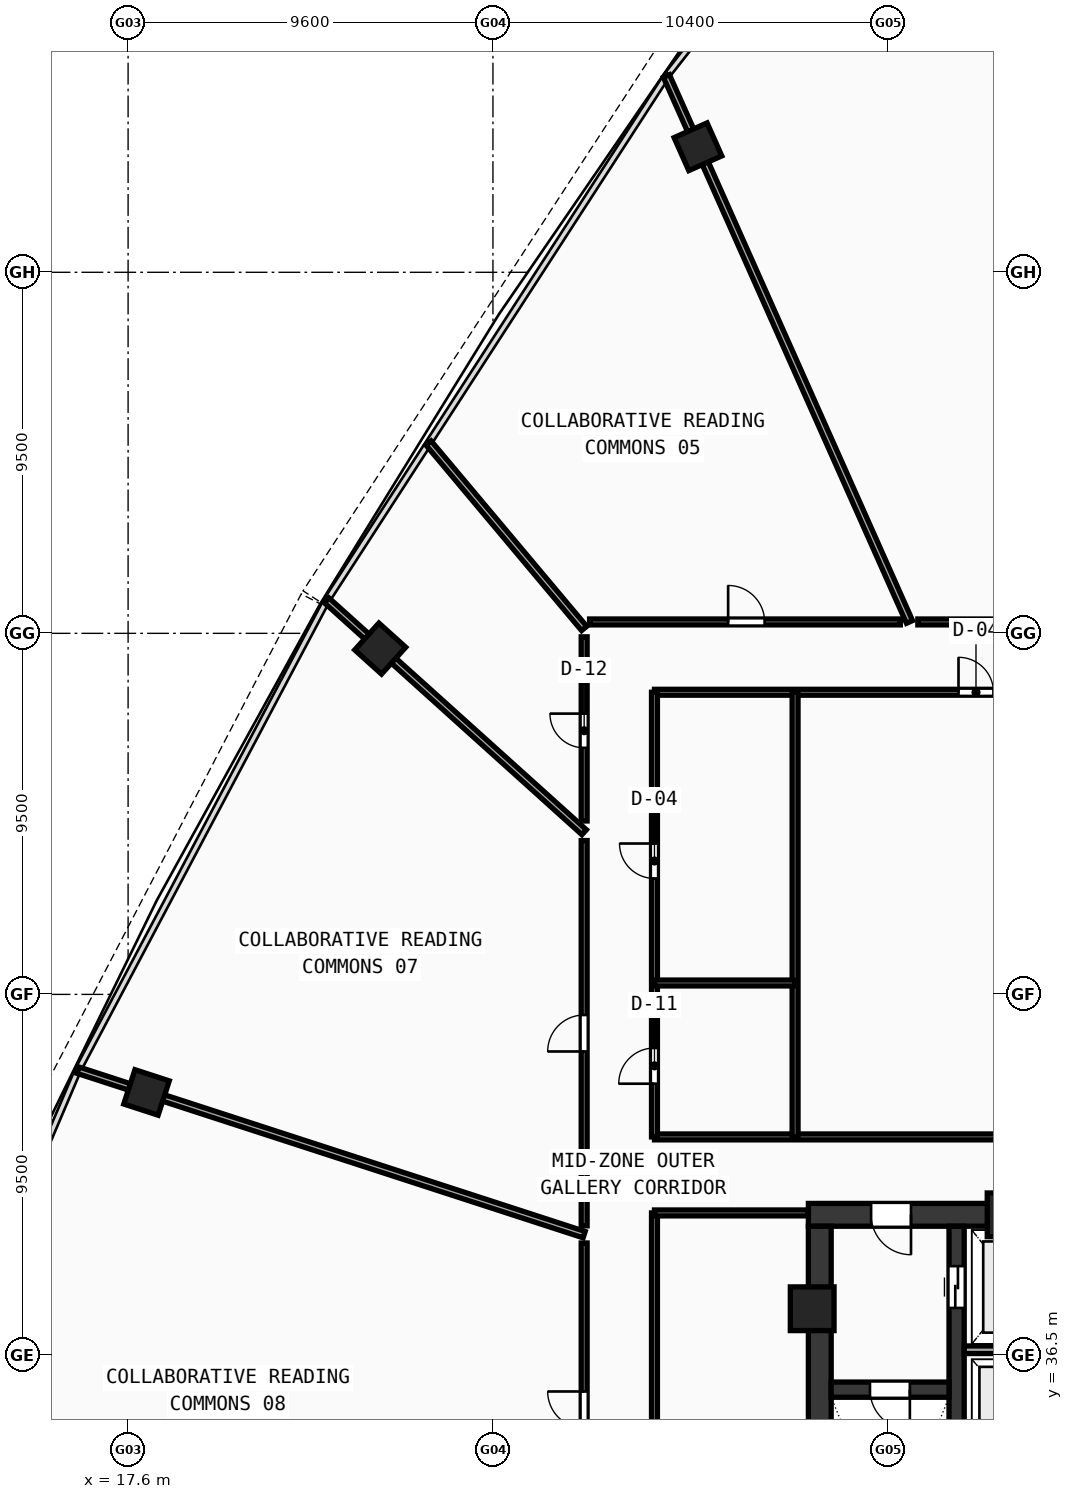
"""IFC4 building model, lengths in metres.
Left out: names, types, materials, properties, quantities, classifications, styles, units other than length and angle.
Written with IfcOpenShell. Run it as: python <this file> out.ifc"""

import sys

from ifc_helpers import new_model, si_unit, direction, frame, frame_2d, origin, origin_with_axes, origin_2d, place, context, subcontext, project, spatial, rectangle, hollow_rectangle, extrude, source, transform, mapped, element, fill, save


model = new_model("IFC4")
c1 = context("Model", 3, precision=1e-05, world=origin(), true_north=direction((0.0, 1.0)))
c2 = subcontext(c1, "Body", "Model", "MODEL_VIEW")
j1 = project(units=[si_unit("LENGTHUNIT", "METRE"), si_unit("PLANEANGLEUNIT", "RADIAN")], contexts=[c1])
p1 = place(None, origin())
s1 = spatial("IfcSite", under=j1, at=p1, CompositionType="ELEMENT")
p2 = place(p1, origin())
s2 = spatial("IfcBuilding", under=s1, at=p2, CompositionType="ELEMENT")
p3 = place(p2, frame((0.0, 0.0, 133.51)))
s3 = spatial("IfcBuildingStorey", under=s2, at=p3, CompositionType="ELEMENT", Elevation=133.51)
p4 = place(p3, frame((35.5, 40.2, 0.0), z_axis=(0.0, 0.0, 1.0), x_axis=(1.0, 0.0, 0.0)))
e1 = element("IfcWall", 1, at=p4, inside=s3, PredefinedType="SHEAR", context=c2, shape_type="SweptSolid", body=[
    extrude(rectangle(XDim=11.3, YDim=0.6, at=frame_2d((5.65, 0.0))), origin(), (0.0, 0.0, 1.0), 3.42),
])
p5 = place(p4, frame((1.65, 0.0, 0.0)))
e2 = element("IfcOpeningElement", 2, at=p5, cuts=e1, PredefinedType="OPENING", context=c2, shape_type="SweptSolid", body=[
    extrude(rectangle(XDim=1.05, YDim=2.1, at=frame_2d((0.525, 1.05))), frame((0.0, 0.31, 0.0), z_axis=(0.0, -1.0, 0.0), x_axis=(1.0, 0.0, 0.0)), (0.0, 0.0, 1.0), 0.62),
])
p6 = place(p3, frame((35.8, 27.8, 0.0), z_axis=(0.0, 0.0, 1.0), x_axis=(0.0, 1.0, 0.0)))
e3 = element("IfcWall", 3, at=p6, inside=s3, PredefinedType="SHEAR", context=c2, shape_type="SweptSolid", body=[
    extrude(rectangle(XDim=12.1, YDim=0.6, at=frame_2d((6.05, 0.0))), origin(), (0.0, 0.0, 1.0), 3.42),
])
p7 = place(p3, frame((39.4, 27.8, 0.0), z_axis=(0.0, 0.0, 1.0), x_axis=(0.0, 1.0, 0.0)))
e4 = element("IfcWall", 4, at=p7, inside=s3, PredefinedType="SHEAR", context=c2, shape_type="SweptSolid", body=[
    extrude(rectangle(XDim=12.1, YDim=0.4, at=frame_2d((6.05, 0.0))), origin(), (0.0, 0.0, 1.0), 3.42),
])
p8 = place(p7, frame((9.95, 0.0, 0.0)))
e5 = element("IfcOpeningElement", 5, at=p8, cuts=e4, PredefinedType="OPENING", context=c2, shape_type="SweptSolid", body=[
    extrude(rectangle(XDim=1.1, YDim=2.1, at=frame_2d((0.55, 1.05))), frame((0.0, 0.21, 0.0), z_axis=(0.0, -1.0, 0.0), x_axis=(1.0, 0.0, 0.0)), (0.0, 0.0, 1.0), 0.42),
])
p9 = place(p3, frame((36.1, 35.6, 0.0), z_axis=(0.0, 0.0, 1.0), x_axis=(1.0, 0.0, 0.0)))
e6 = element("IfcWall", 6, at=p9, inside=s3, PredefinedType="SHEAR", context=c2, shape_type="SweptSolid", body=[
    extrude(rectangle(XDim=3.1, YDim=0.4, at=frame_2d((1.55, 0.0))), origin(), (0.0, 0.0, 1.0), 3.42),
])
p10 = place(p9, frame((1.02, 0.0, 0.0)))
e7 = element("IfcOpeningElement", 7, at=p10, cuts=e6, PredefinedType="OPENING", context=c2, shape_type="SweptSolid", body=[
    extrude(rectangle(XDim=1.05, YDim=2.1, at=frame_2d((0.525, 1.05))), frame((0.0, 0.21, 0.0), z_axis=(0.0, -1.0, 0.0), x_axis=(1.0, 0.0, 0.0)), (0.0, 0.0, 1.0), 0.42),
])
m1 = source(origin(), c2, "Body", "SweptSolid", [
    extrude(hollow_rectangle(XDim=1.15, YDim=1.15, WallThickness=0.048, at=origin_2d()), origin(), (0.0, 0.0, 1.0), 3.68),
])
for number, where, z_axis, x_axis in (
    (8, (40.781, 40.2, -0.26), (0.0, 0.0, 1.0), (1.0, 0.0, 0.0)),
    (9, (35.6, 37.729, -0.26), (0.0, 0.0, 1.0), (1.0, 0.0, 0.0)),
):
    element("IfcColumn", number, at=place(p3, frame(where, z_axis=z_axis, x_axis=x_axis)), inside=s3, PredefinedType="COLUMN", context=c2, shape_type="MappedRepresentation", body=[
        mapped(m1, transform((0.0, 0.0, 0.0), scale=1.0)),
    ])
m2 = source(origin(), c2, "Body", "SweptSolid", [
    extrude(hollow_rectangle(XDim=0.95, YDim=0.95, WallThickness=0.04, at=origin_2d()), origin(), (0.0, 0.0, 1.0), 3.68),
])
for number, where, z_axis, x_axis in (
    (10, (32.594, 68.303, -0.26), (0.0, 0.0, 1.0), (-0.914, -0.407, 0.0)),
    (11, (24.234, 55.099, -0.26), (0.0, 0.0, 1.0), (-0.669, -0.743, 0.0)),
    (12, (18.085, 43.42, -0.26), (0.0, 0.0, 1.0), (-0.309, -0.951, 0.0)),
):
    element("IfcColumn", number, at=place(p3, frame(where, z_axis=z_axis, x_axis=x_axis)), inside=s3, PredefinedType="COLUMN", context=c2, shape_type="MappedRepresentation", body=[
        mapped(m2, transform((0.0, 0.0, 0.0), scale=1.0)),
    ])
p11 = place(p3, frame((39.6, 36.65, 0.0), z_axis=(0.0, 0.0, 1.0), x_axis=(1.0, 0.0, 0.0)))
e13 = element("IfcWall", 13, at=p11, inside=s3, PredefinedType="SOLIDWALL", context=c2, shape_type="SweptSolid", body=[
    extrude(rectangle(XDim=2.72, YDim=0.2, at=frame_2d((1.36, 0.0))), origin(), (0.0, 0.0, 1.0), 3.42),
])
p12 = place(p3, frame((31.45, 42.25, 0.0), z_axis=(0.0, 0.0, 1.0), x_axis=(1.0, 0.0, 0.0)))
e14 = element("IfcWall", 14, at=p12, inside=s3, PredefinedType="PARTITIONING", context=c2, shape_type="SweptSolid", body=[
    extrude(rectangle(XDim=33.1, YDim=0.155, at=frame_2d((16.55, 0.0))), origin(), (0.0, 0.0, 1.0), 2.77),
])
p13 = place(p3, frame((31.45, 53.95, 0.0), z_axis=(0.0, 0.0, 1.0), x_axis=(1.0, 0.0, 0.0)))
e15 = element("IfcWall", 15, at=p13, inside=s3, PredefinedType="PARTITIONING", context=c2, shape_type="SweptSolid", body=[
    extrude(rectangle(XDim=33.1, YDim=0.155, at=frame_2d((16.55, 0.0))), origin(), (0.0, 0.0, 1.0), 2.77),
])
p14 = place(p13, frame((8.0, 0.0, 0.0)))
e16 = element("IfcOpeningElement", 16, at=p14, cuts=e15, PredefinedType="OPENING", context=c2, shape_type="SweptSolid", body=[
    extrude(rectangle(XDim=0.92, YDim=2.1, at=frame_2d((0.46, 1.05))), frame((0.0, 0.087, 0.0), z_axis=(0.0, -1.0, 0.0), x_axis=(1.0, 0.0, 0.0)), (0.0, 0.0, 1.0), 0.175),
])
p15 = place(p13, frame((22.55, 0.0, 0.0)))
e17 = element("IfcOpeningElement", 17, at=p15, cuts=e15, PredefinedType="OPENING", context=c2, shape_type="SweptSolid", body=[
    extrude(rectangle(XDim=0.92, YDim=2.1, at=frame_2d((0.46, 1.05))), frame((0.0, 0.087, 0.0), z_axis=(0.0, -1.0, 0.0), x_axis=(1.0, 0.0, 0.0)), (0.0, 0.0, 1.0), 0.175),
])
p16 = place(p3, frame((31.45, 42.25, 0.0), z_axis=(0.0, 0.0, 1.0), x_axis=(0.0, 1.0, 0.0)))
e18 = element("IfcWall", 18, at=p16, inside=s3, PredefinedType="PARTITIONING", context=c2, shape_type="SweptSolid", body=[
    extrude(rectangle(XDim=11.7, YDim=0.155, at=frame_2d((5.85, 0.0))), origin(), (0.0, 0.0, 1.0), 2.77),
])
p17 = place(p16, frame((1.4, 0.0, 0.0)))
e19 = element("IfcOpeningElement", 19, at=p17, cuts=e18, PredefinedType="OPENING", context=c2, shape_type="SweptSolid", body=[
    extrude(rectangle(XDim=0.94, YDim=2.1, at=frame_2d((0.47, 1.05))), frame((0.0, 0.087, 0.0), z_axis=(0.0, -1.0, 0.0), x_axis=(1.0, 0.0, 0.0)), (0.0, 0.0, 1.0), 0.175),
])
p18 = place(p16, frame((6.8, 0.0, 0.0)))
e20 = element("IfcOpeningElement", 20, at=p18, cuts=e18, PredefinedType="OPENING", context=c2, shape_type="SweptSolid", body=[
    extrude(rectangle(XDim=0.92, YDim=2.1, at=frame_2d((0.46, 1.05))), frame((0.0, 0.087, 0.0), z_axis=(0.0, -1.0, 0.0), x_axis=(1.0, 0.0, 0.0)), (0.0, 0.0, 1.0), 0.175),
])
p19 = place(p3, frame((35.15, 42.25, 0.0), z_axis=(0.0, 0.0, 1.0), x_axis=(0.0, 1.0, 0.0)))
e21 = element("IfcWall", 21, at=p19, inside=s3, PredefinedType="PARTITIONING", context=c2, shape_type="SweptSolid", body=[
    extrude(rectangle(XDim=11.7, YDim=0.155, at=frame_2d((5.85, 0.0))), origin(), (0.0, 0.0, 1.0), 2.77),
])
p20 = place(p3, frame((31.45, 46.3, 0.0), z_axis=(0.0, 0.0, 1.0), x_axis=(1.0, 0.0, 0.0)))
e22 = element("IfcWall", 22, at=p20, inside=s3, PredefinedType="PARTITIONING", context=c2, shape_type="SweptSolid", body=[
    extrude(rectangle(XDim=3.7, YDim=0.155, at=frame_2d((1.85, 0.0))), origin(), (0.0, 0.0, 1.0), 2.77),
])
p21 = place(p3, frame((31.45, 23.65, 0.0), z_axis=(0.0, 0.0, 1.0), x_axis=(0.0, 1.0, 0.0)))
e23 = element("IfcWall", 23, at=p21, inside=s3, PredefinedType="PARTITIONING", context=c2, shape_type="SweptSolid", body=[
    extrude(rectangle(XDim=16.6, YDim=0.155, at=frame_2d((8.3, 0.0))), origin(), (0.0, 0.0, 1.0), 2.77),
])
p22 = place(p21, frame((7.5, 0.0, 0.0)))
e24 = element("IfcOpeningElement", 24, at=p22, cuts=e23, PredefinedType="OPENING", context=c2, shape_type="SweptSolid", body=[
    extrude(rectangle(XDim=0.9, YDim=2.08, at=frame_2d((0.45, 1.04))), frame((0.0, 0.087, 0.0), z_axis=(0.0, -1.0, 0.0), x_axis=(1.0, 0.0, 0.0)), (0.0, 0.0, 1.0), 0.175),
])
p23 = place(p3, frame((31.45, 40.25, 0.0), z_axis=(0.0, 0.0, 1.0), x_axis=(1.0, 0.0, 0.0)))
e25 = element("IfcWall", 25, at=p23, inside=s3, PredefinedType="PARTITIONING", context=c2, shape_type="SweptSolid", body=[
    extrude(rectangle(XDim=4.05, YDim=0.155, at=frame_2d((2.025, 0.0))), origin(), (0.0, 0.0, 1.0), 3.42),
])
p24 = place(p3, frame((38.16, 55.8, 0.0), z_axis=(0.0, 0.0, 1.0), x_axis=(-0.406729069032, 0.913548829787, 0.0)))
e26 = element("IfcWall", 26, at=p24, inside=s3, PredefinedType="PARTITIONING", context=c2, shape_type="SweptSolid", body=[
    extrude(rectangle(XDim=15.723, YDim=0.175, at=frame_2d((7.862, 0.0))), origin(), (0.0, 0.0, 1.0), 2.77),
])
p25 = place(p3, frame((29.6, 55.628, 0.0), z_axis=(0.0, 0.0, 1.0), x_axis=(-0.642790889975, 0.766041690618, 0.0)))
e27 = element("IfcWall", 27, at=p25, inside=s3, PredefinedType="PARTITIONING", context=c2, shape_type="SweptSolid", body=[
    extrude(rectangle(XDim=6.366, YDim=0.175, at=frame_2d((3.183, 0.0))), origin(), (0.0, 0.0, 1.0), 2.77),
])
p26 = place(p3, frame((29.6, 50.267, 0.0), z_axis=(0.0, 0.0, 1.0), x_axis=(-0.743139639416, 0.669136366018, 0.0)))
e28 = element("IfcWall", 28, at=p26, inside=s3, PredefinedType="PARTITIONING", context=c2, shape_type="SweptSolid", body=[
    extrude(rectangle(XDim=9.115, YDim=0.175, at=frame_2d((4.558, 0.0))), origin(), (0.0, 0.0, 1.0), 2.77),
])
p27 = place(p3, frame((29.6, 39.678, 0.0), z_axis=(0.0, 0.0, 1.0), x_axis=(-0.95105622709, 0.309017884457, 0.0)))
e29 = element("IfcWall", 29, at=p27, inside=s3, PredefinedType="PARTITIONING", context=c2, shape_type="SweptSolid", body=[
    extrude(rectangle(XDim=14.006, YDim=0.175, at=frame_2d((7.003, 0.0))), origin(), (0.0, 0.0, 1.0), 2.77),
])
p28 = place(p3, frame((29.6, 30.675, 0.0), z_axis=(0.0, 0.0, 1.0), x_axis=(0.0, 1.0, 0.0)))
e30 = element("IfcWall", 30, at=p28, inside=s3, PredefinedType="PARTITIONING", context=c2, shape_type="SweptSolid", body=[
    extrude(rectangle(XDim=8.783, YDim=0.155, at=frame_2d((4.392, 0.0))), origin(), (0.0, 0.0, 1.0), 3.42),
])
p29 = place(p28, frame((3.917, 0.0, 0.0)))
e31 = element("IfcOpeningElement", 31, at=p29, cuts=e30, PredefinedType="OPENING", context=c2, shape_type="SweptSolid", body=[
    extrude(rectangle(XDim=0.96, YDim=2.12, at=frame_2d((0.48, 1.06))), frame((0.0, 0.087, 0.0), z_axis=(0.0, -1.0, 0.0), x_axis=(1.0, 0.0, 0.0)), (0.0, 0.0, 1.0), 0.175),
])
p30 = place(p3, frame((29.6, 39.91, 0.0), z_axis=(0.0, 0.0, 1.0), x_axis=(0.0, 1.0, 0.0)))
e32 = element("IfcWall", 32, at=p30, inside=s3, PredefinedType="PARTITIONING", context=c2, shape_type="SweptSolid", body=[
    extrude(rectangle(XDim=10.138, YDim=0.155, at=frame_2d((5.069, 0.0))), origin(), (0.0, 0.0, 1.0), 2.77),
])
p31 = place(p30, frame((4.588, 0.0, 0.0)))
e33 = element("IfcOpeningElement", 33, at=p31, cuts=e32, PredefinedType="OPENING", context=c2, shape_type="SweptSolid", body=[
    extrude(rectangle(XDim=0.96, YDim=2.12, at=frame_2d((0.48, 1.06))), frame((0.0, 0.087, 0.0), z_axis=(0.0, -1.0, 0.0), x_axis=(1.0, 0.0, 0.0)), (0.0, 0.0, 1.0), 0.175),
])
p32 = place(p3, frame((29.6, 50.563, 0.0), z_axis=(0.0, 0.0, 1.0), x_axis=(0.0, 1.0, 0.0)))
e34 = element("IfcWall", 34, at=p32, inside=s3, PredefinedType="PARTITIONING", context=c2, shape_type="SweptSolid", body=[
    extrude(rectangle(XDim=4.845, YDim=0.155, at=frame_2d((2.422, 0.0))), origin(), (0.0, 0.0, 1.0), 3.02),
])
p33 = place(p32, frame((1.925, 0.0, 0.0)))
e35 = element("IfcOpeningElement", 35, at=p33, cuts=e34, PredefinedType="OPENING", context=c2, shape_type="SweptSolid", body=[
    extrude(rectangle(XDim=0.9, YDim=2.08, at=frame_2d((0.45, 1.04))), frame((0.0, 0.087, 0.0), z_axis=(0.0, -1.0, 0.0), x_axis=(1.0, 0.0, 0.0)), (0.0, 0.0, 1.0), 0.175),
])
p34 = place(p3, frame((29.743, 55.8, 0.0), z_axis=(0.0, 0.0, 1.0), x_axis=(1.0, 0.0, 0.0)))
e36 = element("IfcWall", 36, at=p34, inside=s3, PredefinedType="PARTITIONING", context=c2, shape_type="SweptSolid", body=[
    extrude(rectangle(XDim=8.177, YDim=0.155, at=frame_2d((4.088, 0.0))), origin(), (0.0, 0.0, 1.0), 3.02),
])
p35 = place(p34, frame((3.646, 0.0, 0.0)))
e37 = element("IfcOpeningElement", 37, at=p35, cuts=e36, PredefinedType="OPENING", context=c2, shape_type="SweptSolid", body=[
    extrude(rectangle(XDim=0.96, YDim=2.12, at=frame_2d((0.48, 1.06))), frame((0.0, 0.087, 0.0), z_axis=(0.0, -1.0, 0.0), x_axis=(1.0, 0.0, 0.0)), (0.0, 0.0, 1.0), 0.175),
])
p36 = place(p3, frame((38.38, 55.8, 0.0), z_axis=(0.0, 0.0, 1.0), x_axis=(1.0, 0.0, 0.0)))
e38 = element("IfcWall", 38, at=p36, inside=s3, PredefinedType="PARTITIONING", context=c2, shape_type="SweptSolid", body=[
    extrude(rectangle(XDim=5.329, YDim=0.155, at=frame_2d((2.665, 0.0))), origin(), (0.0, 0.0, 1.0), 2.77),
])
p37 = place(p36, frame((2.115, 0.0, 0.0)))
e39 = element("IfcOpeningElement", 39, at=p37, cuts=e38, PredefinedType="OPENING", context=c2, shape_type="SweptSolid", body=[
    extrude(rectangle(XDim=0.96, YDim=2.12, at=frame_2d((0.48, 1.06))), frame((0.0, 0.087, 0.0), z_axis=(0.0, -1.0, 0.0), x_axis=(1.0, 0.0, 0.0)), (0.0, 0.0, 1.0), 0.175),
])
m3 = source(origin(), c2, "Body", "SweptSolid", [
    extrude(rectangle(XDim=1.05, YDim=2.1, at=frame_2d((0.525, 1.05))), frame((0.0, 0.025, 0.0), z_axis=(0.0, -1.0, 0.0), x_axis=(1.0, 0.0, 0.0)), (0.0, 0.0, 1.0), 0.05),
])
p38 = place(p10, frame((1.05, 0.0, 0.0), z_axis=(0.0, 0.0, 1.0), x_axis=(-1.0, 0.0, 0.0)))
e40 = element("IfcDoor", 40, at=p38, inside=s3, OperationType="SINGLE_SWING_LEFT", PredefinedType="DOOR", context=c2, shape_type="MappedRepresentation", body=[
    mapped(m3, transform((0.0, 0.0, 0.0), scale=1.0)),
])
fill(e7, e40)
p39 = place(p5, frame((1.05, 0.0, 0.0), z_axis=(0.0, 0.0, 1.0), x_axis=(-1.0, 0.0, 0.0)))
e41 = element("IfcDoor", 41, at=p39, inside=s3, OperationType="SINGLE_SWING_LEFT", PredefinedType="DOOR", context=c2, shape_type="MappedRepresentation", body=[
    mapped(m3, transform((0.0, 0.0, 0.0), scale=1.0)),
])
fill(e2, e41)
m4 = source(origin(), c2, "Body", "SweptSolid", [
    extrude(rectangle(XDim=1.1, YDim=2.1, at=frame_2d((0.55, 1.05))), frame((0.0, 0.025, 0.0), z_axis=(0.0, -1.0, 0.0), x_axis=(1.0, 0.0, 0.0)), (0.0, 0.0, 1.0), 0.05),
])
p40 = place(p8, frame((1.1, 0.0, 0.0), z_axis=(0.0, 0.0, 1.0), x_axis=(-1.0, 0.0, 0.0)))
e42 = element("IfcDoor", 42, at=p40, inside=s3, OperationType="DOUBLE_DOOR_SLIDING", PredefinedType="DOOR", context=c2, shape_type="MappedRepresentation", body=[
    mapped(m4, transform((0.0, 0.0, 0.0), scale=1.0)),
])
fill(e5, e42)
m5 = source(origin(), c2, "Body", "SweptSolid", [
    extrude(rectangle(XDim=0.94, YDim=2.1, at=frame_2d((0.47, 1.05))), frame((0.0, 0.025, 0.0), z_axis=(0.0, -1.0, 0.0), x_axis=(1.0, 0.0, 0.0)), (0.0, 0.0, 1.0), 0.05),
])
p41 = place(p17, origin_with_axes())
e43 = element("IfcDoor", 43, at=p41, inside=s3, OperationType="SINGLE_SWING_LEFT", PredefinedType="DOOR", context=c2, shape_type="MappedRepresentation", body=[
    mapped(m5, transform((0.0, 0.0, 0.0), scale=1.0)),
])
fill(e19, e43)
m6 = source(origin(), c2, "Body", "SweptSolid", [
    extrude(rectangle(XDim=0.92, YDim=2.1, at=frame_2d((0.46, 1.05))), frame((0.0, 0.025, 0.0), z_axis=(0.0, -1.0, 0.0), x_axis=(1.0, 0.0, 0.0)), (0.0, 0.0, 1.0), 0.05),
])
p42 = place(p18, origin_with_axes())
e44 = element("IfcDoor", 44, at=p42, inside=s3, OperationType="SINGLE_SWING_RIGHT", PredefinedType="DOOR", context=c2, shape_type="MappedRepresentation", body=[
    mapped(m6, transform((0.0, 0.0, 0.0), scale=1.0)),
])
fill(e20, e44)
p43 = place(p14, origin_with_axes())
e45 = element("IfcDoor", 45, at=p43, inside=s3, OperationType="SINGLE_SWING_LEFT", PredefinedType="DOOR", context=c2, shape_type="MappedRepresentation", body=[
    mapped(m6, transform((0.0, 0.0, 0.0), scale=1.0)),
])
fill(e16, e45)
m7 = source(origin(), c2, "Body", "SweptSolid", [
    extrude(rectangle(XDim=0.96, YDim=2.12, at=frame_2d((0.48, 1.06))), frame((0.0, 0.025, 0.0), z_axis=(0.0, -1.0, 0.0), x_axis=(1.0, 0.0, 0.0)), (0.0, 0.0, 1.0), 0.05),
])
p44 = place(p35, origin_with_axes())
e46 = element("IfcDoor", 46, at=p44, inside=s3, OperationType="SINGLE_SWING_LEFT", PredefinedType="DOOR", context=c2, shape_type="MappedRepresentation", body=[
    mapped(m7, transform((0.0, 0.0, 0.0), scale=1.0)),
])
fill(e37, e46)
m8 = source(origin(), c2, "Body", "SweptSolid", [
    extrude(rectangle(XDim=0.9, YDim=2.08, at=frame_2d((0.45, 1.04))), frame((0.0, 0.025, 0.0), z_axis=(0.0, -1.0, 0.0), x_axis=(1.0, 0.0, 0.0)), (0.0, 0.0, 1.0), 0.05),
])
p45 = place(p33, origin_with_axes())
e47 = element("IfcDoor", 47, at=p45, inside=s3, OperationType="SINGLE_SWING_RIGHT", PredefinedType="DOOR", context=c2, shape_type="MappedRepresentation", body=[
    mapped(m8, transform((0.0, 0.0, 0.0), scale=1.0)),
])
fill(e35, e47)
p46 = place(p31, origin_with_axes())
e48 = element("IfcDoor", 48, at=p46, inside=s3, OperationType="SINGLE_SWING_LEFT", PredefinedType="DOOR", context=c2, shape_type="MappedRepresentation", body=[
    mapped(m7, transform((0.0, 0.0, 0.0), scale=1.0)),
])
fill(e33, e48)
p47 = place(p29, origin_with_axes())
e49 = element("IfcDoor", 49, at=p47, inside=s3, OperationType="SINGLE_SWING_RIGHT", PredefinedType="DOOR", context=c2, shape_type="MappedRepresentation", body=[
    mapped(m7, transform((0.0, 0.0, 0.0), scale=1.0)),
])
fill(e31, e49)
save(model, sys.argv[1])
